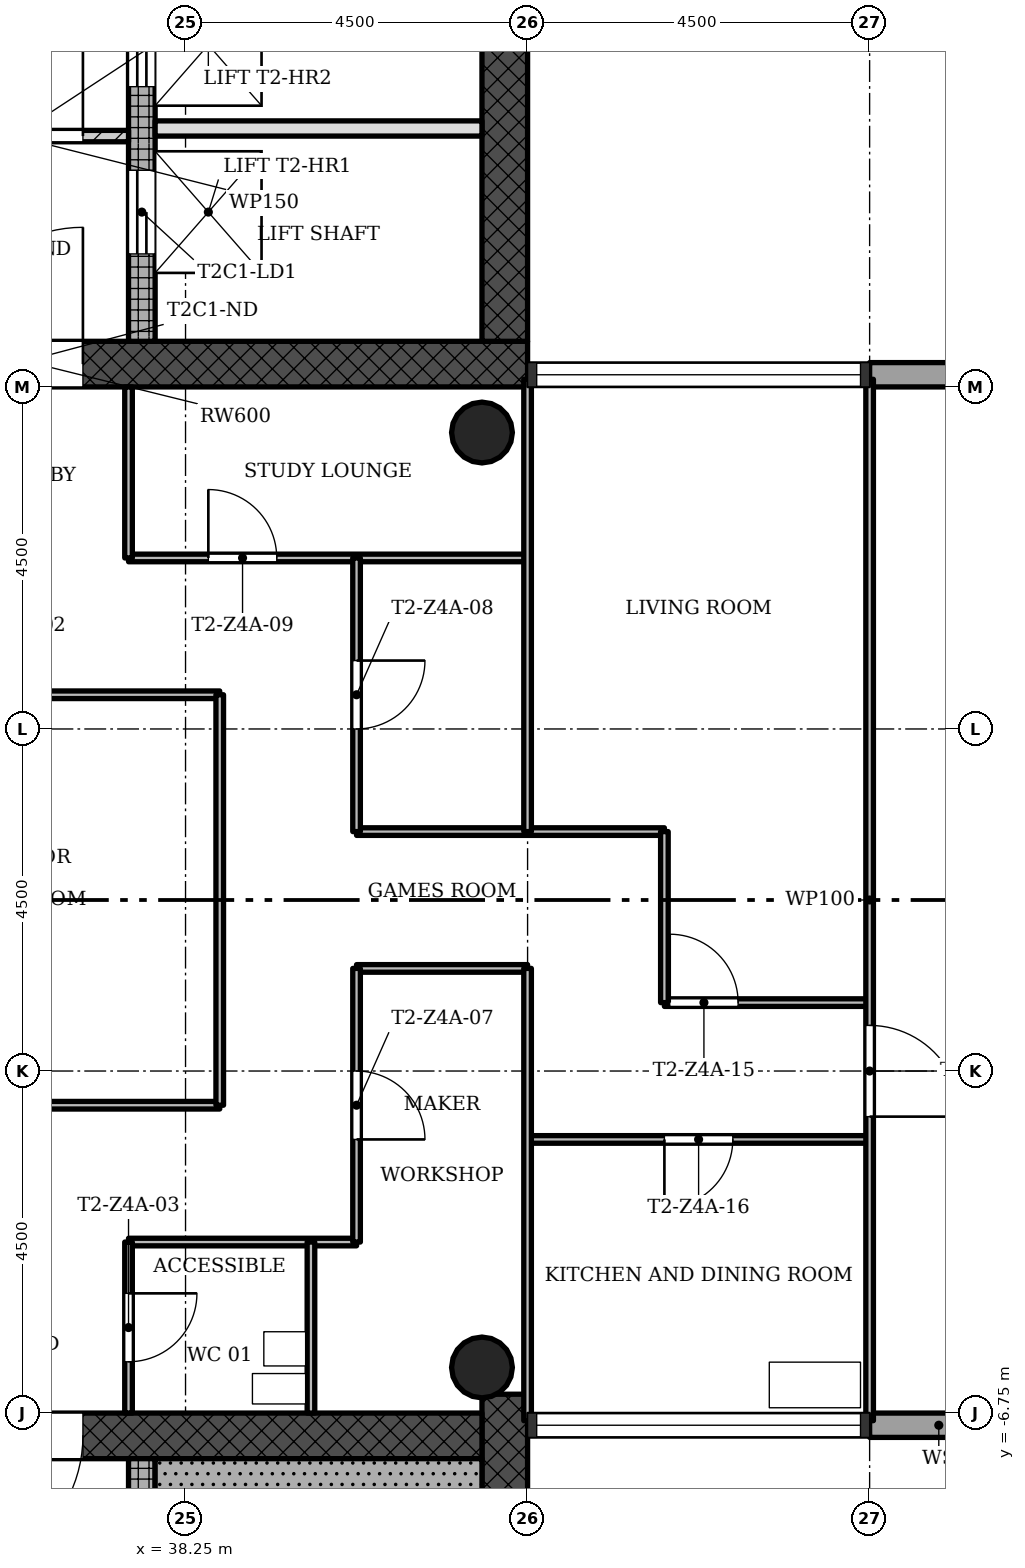
"""IFC4 building model, lengths in metres.
Left out: names, types, materials, properties, quantities, classifications, styles, units other than length and angle.
Written with IfcOpenShell. Run it as: python <this file> out.ifc"""

import sys

from ifc_helpers import new_model, si_unit, direction, frame, frame_2d, origin, origin_2d, place, context, subcontext, project, spatial, rectangle, hollow_circle, extrude, element, fill, save


model = new_model("IFC4")
c1 = context("Model", 3, precision=1e-05, world=origin(), true_north=direction((0.0, 1.0)))
c2 = subcontext(c1, "Body", "Model", "MODEL_VIEW")
j1 = project(units=[si_unit("LENGTHUNIT", "METRE"), si_unit("PLANEANGLEUNIT", "RADIAN")], contexts=[c1])
p1 = place(None, origin())
s1 = spatial("IfcSite", under=j1, at=p1, CompositionType="ELEMENT")
p2 = place(p1, origin())
s2 = spatial("IfcBuilding", under=s1, at=p2, CompositionType="ELEMENT")
p3 = place(p2, frame((0.0, 0.0, 226.6)))
s3 = spatial("IfcBuildingStorey", under=s2, at=p3, CompositionType="ELEMENT", Elevation=226.6)
p4 = place(p3, frame((29.85, 7.05, 0.0), z_axis=(0.0, 0.0, 1.0), x_axis=(1.0, 0.0, 0.0)))
e1 = element("IfcWall", 1, at=p4, inside=s3, PredefinedType="SHEAR", context=c2, shape_type="SweptSolid", body=[
    extrude(rectangle(XDim=12.9, YDim=0.6, at=frame_2d((6.45, 0.0))), origin(), (0.0, 0.0, 1.0), 3.4),
])
p5 = place(p4, frame((5.25, 0.0, 0.0)))
e2 = element("IfcOpeningElement", 2, at=p5, cuts=e1, PredefinedType="OPENING", context=c2, shape_type="SweptSolid", body=[
    extrude(rectangle(XDim=1.8, YDim=2.1, at=frame_2d((0.9, 1.05))), frame((0.0, 0.31, 0.0), z_axis=(0.0, -1.0, 0.0), x_axis=(1.0, 0.0, 0.0)), (0.0, 0.0, 1.0), 0.62),
])
p6 = place(p3, frame((42.45, 7.35, 0.0), z_axis=(0.0, 0.0, 1.0), x_axis=(0.0, 1.0, 0.0)))
e3 = element("IfcWall", 3, at=p6, inside=s3, PredefinedType="SHEAR", context=c2, shape_type="SweptSolid", body=[
    extrude(rectangle(XDim=8.4, YDim=0.6, at=frame_2d((4.2, 0.0))), origin(), (0.0, 0.0, 1.0), 3.4),
])
p7 = place(p3, frame((37.675, 7.35, 0.0), z_axis=(0.0, 0.0, 1.0), x_axis=(0.0, 1.0, 0.0)))
e4 = element("IfcWall", 4, at=p7, inside=s3, PredefinedType="SHEAR", context=c2, shape_type="SweptSolid", body=[
    extrude(rectangle(XDim=7.8, YDim=0.35, at=frame_2d((3.9, 0.0))), origin(), (0.0, 0.0, 1.0), 3.4),
])
p8 = place(p7, frame((1.15, 0.0, 0.0)))
e5 = element("IfcOpeningElement", 5, at=p8, cuts=e4, PredefinedType="OPENING", context=c2, shape_type="SweptSolid", body=[
    extrude(rectangle(XDim=1.1, YDim=2.1, at=frame_2d((0.55, 1.05))), frame((0.0, 0.185, 0.0), z_axis=(0.0, -1.0, 0.0), x_axis=(1.0, 0.0, 0.0)), (0.0, 0.0, 1.0), 0.37),
])
p9 = place(p7, frame((3.35, 0.0, 0.0)))
e6 = element("IfcOpeningElement", 6, at=p9, cuts=e4, PredefinedType="OPENING", context=c2, shape_type="SweptSolid", body=[
    extrude(rectangle(XDim=1.1, YDim=2.1, at=frame_2d((0.55, 1.05))), frame((0.0, 0.185, 0.0), z_axis=(0.0, -1.0, 0.0), x_axis=(1.0, 0.0, 0.0)), (0.0, 0.0, 1.0), 0.37),
])
p10 = place(p7, frame((5.55, 0.0, 0.0)))
e7 = element("IfcOpeningElement", 7, at=p10, cuts=e4, PredefinedType="OPENING", context=c2, shape_type="SweptSolid", body=[
    extrude(rectangle(XDim=1.1, YDim=2.1, at=frame_2d((0.55, 1.05))), frame((0.0, 0.185, 0.0), z_axis=(0.0, -1.0, 0.0), x_axis=(1.0, 0.0, 0.0)), (0.0, 0.0, 1.0), 0.37),
])
p11 = place(p3, frame((42.45, -15.15, 0.0), z_axis=(0.0, 0.0, 1.0), x_axis=(0.0, 1.0, 0.0)))
e8 = element("IfcWall", 8, at=p11, inside=s3, PredefinedType="SHEAR", context=c2, shape_type="SweptSolid", body=[
    extrude(rectangle(XDim=8.648, YDim=0.6, at=frame_2d((4.324, 0.0))), origin(), (0.0, 0.0, 1.0), 3.4),
])
p12 = place(p3, frame((42.15, -7.05, 0.0), z_axis=(0.0, 0.0, 1.0), x_axis=(-1.0, 0.0, 0.0)))
e9 = element("IfcWall", 9, at=p12, inside=s3, PredefinedType="SHEAR", context=c2, shape_type="SweptSolid", body=[
    extrude(rectangle(XDim=12.9, YDim=0.6, at=frame_2d((6.45, 0.0))), origin(), (0.0, 0.0, 1.0), 3.4),
])
p13 = place(p12, frame((5.25, 0.0, 0.0)))
e10 = element("IfcOpeningElement", 10, at=p13, cuts=e9, PredefinedType="OPENING", context=c2, shape_type="SweptSolid", body=[
    extrude(rectangle(XDim=1.8, YDim=2.1, at=frame_2d((0.9, 1.05))), frame((0.0, 0.31, 0.0), z_axis=(0.0, -1.0, 0.0), x_axis=(1.0, 0.0, 0.0)), (0.0, 0.0, 1.0), 0.62),
])
p14 = place(p3, frame((37.675, -15.15, 0.0), z_axis=(0.0, 0.0, 1.0), x_axis=(0.0, 1.0, 0.0)))
e11 = element("IfcWall", 11, at=p14, inside=s3, PredefinedType="SHEAR", context=c2, shape_type="SweptSolid", body=[
    extrude(rectangle(XDim=7.8, YDim=0.35, at=frame_2d((3.9, 0.0))), origin(), (0.0, 0.0, 1.0), 3.4),
])
p15 = place(p14, frame((5.85, 0.0, 0.0)))
e12 = element("IfcOpeningElement", 12, at=p15, cuts=e11, PredefinedType="OPENING", context=c2, shape_type="SweptSolid", body=[
    extrude(rectangle(XDim=0.9, YDim=2.1, at=frame_2d((0.45, 1.05))), frame((0.0, 0.185, 0.0), z_axis=(0.0, -1.0, 0.0), x_axis=(1.0, 0.0, 0.0)), (0.0, 0.0, 1.0), 0.37),
])
for number, where, z_axis, x_axis in (
    (13, (42.15, -6.15, 0.0), (0.0, 0.0, 1.0), (1.0, 0.0, 0.0)),
    (14, (42.15, 6.15, 0.0), (0.0, 0.0, 1.0), (1.0, 0.0, 0.0)),
):
    element("IfcColumn", number, at=place(p3, frame(where, z_axis=z_axis, x_axis=x_axis)), inside=s3, PredefinedType="COLUMN", context=c2, shape_type="SweptSolid", body=[
        extrude(hollow_circle(Radius=0.4, WallThickness=0.028, at=origin_2d()), origin(), (0.0, 0.0, 1.0), 3.4),
    ])
p16 = place(p3, frame((47.25, -6.91, -0.3), z_axis=(0.0, 0.0, 1.0), x_axis=(1.0, 0.0, 0.0)))
e15 = element("IfcWall", 15, at=p16, inside=s3, PredefinedType="STANDARD", context=c2, shape_type="SweptSolid", body=[
    extrude(rectangle(XDim=1.82, YDim=0.32, at=frame_2d((0.91, 0.0))), origin(), (0.0, 0.0, 1.0), 3.4),
])
p17 = place(p3, frame((48.75, 6.91, -0.3), z_axis=(0.0, 0.0, 1.0), x_axis=(-1.0, 0.0, 0.0)))
e16 = element("IfcWall", 16, at=p17, inside=s3, PredefinedType="STANDARD", context=c2, shape_type="SweptSolid", body=[
    extrude(rectangle(XDim=1.5, YDim=0.32, at=frame_2d((0.75, 0.0))), origin(), (0.0, 0.0, 1.0), 3.4),
])
p18 = place(p3, frame((37.5, 10.05, 0.0), z_axis=(0.0, 0.0, 1.0), x_axis=(-1.0, 0.0, 0.0)))
e17 = element("IfcWall", 17, at=p18, inside=s3, PredefinedType="PARTITIONING", context=c2, shape_type="SweptSolid", body=[
    extrude(rectangle(XDim=3.0, YDim=0.15, at=frame_2d((1.5, 0.0))), origin(), (0.0, 0.0, 1.0), 3.0),
])
p19 = place(p18, frame((0.6, 0.0, 0.0)))
e18 = element("IfcOpeningElement", 18, at=p19, cuts=e17, PredefinedType="OPENING", context=c2, shape_type="SweptSolid", body=[
    extrude(rectangle(XDim=1.8, YDim=2.1, at=frame_2d((0.9, 1.05))), frame((0.0, 0.085, 0.0), z_axis=(0.0, -1.0, 0.0), x_axis=(1.0, 0.0, 0.0)), (0.0, 0.0, 1.0), 0.17),
])
p20 = place(p3, frame((42.15, 10.15, 0.0), z_axis=(0.0, 0.0, 1.0), x_axis=(-1.0, 0.0, 0.0)))
e19 = element("IfcWall", 19, at=p20, inside=s3, PredefinedType="SOLIDWALL", context=c2, shape_type="SweptSolid", body=[
    extrude(rectangle(XDim=4.3, YDim=0.2, at=frame_2d((2.15, 0.0))), origin(), (0.0, 0.0, 1.0), 3.0),
])
p21 = place(p3, frame((40.5, -4.5, 0.0), z_axis=(0.0, 0.0, 1.0), x_axis=(-1.0, 0.0, 0.0)))
e20 = element("IfcWall", 20, at=p21, inside=s3, PredefinedType="PARTITIONING", context=c2, shape_type="SweptSolid", body=[
    extrude(rectangle(XDim=3.0, YDim=0.1, at=frame_2d((1.5, 0.0))), origin(), (0.0, 0.0, 1.0), 3.0),
])
p22 = place(p3, frame((47.25, -3.15, 0.0), z_axis=(0.0, 0.0, 1.0), x_axis=(-1.0, 0.0, 0.0)))
e21 = element("IfcWall", 21, at=p22, inside=s3, PredefinedType="PARTITIONING", context=c2, shape_type="SweptSolid", body=[
    extrude(rectangle(XDim=4.5, YDim=0.1, at=frame_2d((2.25, 0.0))), origin(), (0.0, 0.0, 1.0), 3.0),
])
p23 = place(p22, frame((1.8, 0.0, 0.0)))
e22 = element("IfcOpeningElement", 22, at=p23, cuts=e21, PredefinedType="OPENING", context=c2, shape_type="SweptSolid", body=[
    extrude(rectangle(XDim=0.9, YDim=2.1, at=frame_2d((0.45, 1.05))), frame((0.0, 0.06, 0.0), z_axis=(0.0, -1.0, 0.0), x_axis=(1.0, 0.0, 0.0)), (0.0, 0.0, 1.0), 0.12),
])
p24 = place(p3, frame((38.7, -2.7, 0.0), z_axis=(0.0, 0.0, 1.0), x_axis=(-1.0, 0.0, 0.0)))
e23 = element("IfcWall", 23, at=p24, inside=s3, PredefinedType="PARTITIONING", context=c2, shape_type="SweptSolid", body=[
    extrude(rectangle(XDim=5.4, YDim=0.1, at=frame_2d((2.7, 0.0))), origin(), (0.0, 0.0, 1.0), 3.0),
])
p25 = place(p3, frame((47.25, -1.35, 0.0), z_axis=(0.0, 0.0, 1.0), x_axis=(-1.0, 0.0, 0.0)))
e24 = element("IfcWall", 24, at=p25, inside=s3, PredefinedType="PARTITIONING", context=c2, shape_type="SweptSolid", body=[
    extrude(rectangle(XDim=2.7, YDim=0.1, at=frame_2d((1.35, 0.0))), origin(), (0.0, 0.0, 1.0), 3.0),
])
p26 = place(p25, frame((1.73, 0.0, 0.0)))
e25 = element("IfcOpeningElement", 25, at=p26, cuts=e24, PredefinedType="OPENING", context=c2, shape_type="SweptSolid", body=[
    extrude(rectangle(XDim=0.9, YDim=2.1, at=frame_2d((0.45, 1.05))), frame((0.0, 0.06, 0.0), z_axis=(0.0, -1.0, 0.0), x_axis=(1.0, 0.0, 0.0)), (0.0, 0.0, 1.0), 0.12),
])
p27 = place(p3, frame((42.75, -0.9, 0.0), z_axis=(0.0, 0.0, 1.0), x_axis=(-1.0, 0.0, 0.0)))
e26 = element("IfcWall", 26, at=p27, inside=s3, PredefinedType="PARTITIONING", context=c2, shape_type="SweptSolid", body=[
    extrude(rectangle(XDim=2.25, YDim=0.1, at=frame_2d((1.125, 0.0))), origin(), (0.0, 0.0, 1.0), 3.0),
])
p28 = place(p3, frame((44.55, 0.9, 0.0), z_axis=(0.0, 0.0, 1.0), x_axis=(-1.0, 0.0, 0.0)))
e27 = element("IfcWall", 27, at=p28, inside=s3, PredefinedType="PARTITIONING", context=c2, shape_type="SweptSolid", body=[
    extrude(rectangle(XDim=4.05, YDim=0.1, at=frame_2d((2.025, 0.0))), origin(), (0.0, 0.0, 1.0), 3.0),
])
p29 = place(p3, frame((38.7, 2.7, 0.0), z_axis=(0.0, 0.0, 1.0), x_axis=(-1.0, 0.0, 0.0)))
e28 = element("IfcWall", 28, at=p29, inside=s3, PredefinedType="PARTITIONING", context=c2, shape_type="SweptSolid", body=[
    extrude(rectangle(XDim=5.4, YDim=0.1, at=frame_2d((2.7, 0.0))), origin(), (0.0, 0.0, 1.0), 3.0),
])
p30 = place(p29, frame((2.25, 0.0, 0.0)))
e29 = element("IfcOpeningElement", 29, at=p30, cuts=e28, PredefinedType="OPENING", context=c2, shape_type="SweptSolid", body=[
    extrude(rectangle(XDim=0.9, YDim=2.1, at=frame_2d((0.45, 1.05))), frame((0.0, 0.06, 0.0), z_axis=(0.0, -1.0, 0.0), x_axis=(1.0, 0.0, 0.0)), (0.0, 0.0, 1.0), 0.12),
])
p31 = place(p3, frame((42.75, 4.5, 0.0), z_axis=(0.0, 0.0, 1.0), x_axis=(-1.0, 0.0, 0.0)))
e30 = element("IfcWall", 30, at=p31, inside=s3, PredefinedType="PARTITIONING", context=c2, shape_type="SweptSolid", body=[
    extrude(rectangle(XDim=5.25, YDim=0.1, at=frame_2d((2.625, 0.0))), origin(), (0.0, 0.0, 1.0), 3.0),
])
p32 = place(p31, frame((3.3, 0.0, 0.0)))
e31 = element("IfcOpeningElement", 31, at=p32, cuts=e30, PredefinedType="OPENING", context=c2, shape_type="SweptSolid", body=[
    extrude(rectangle(XDim=0.9, YDim=2.1, at=frame_2d((0.45, 1.05))), frame((0.0, 0.06, 0.0), z_axis=(0.0, -1.0, 0.0), x_axis=(1.0, 0.0, 0.0)), (0.0, 0.0, 1.0), 0.12),
])
p33 = place(p3, frame((47.25, -6.85, 0.0), z_axis=(0.0, 0.0, 1.0), x_axis=(0.0, 1.0, 0.0)))
e32 = element("IfcWall", 32, at=p33, inside=s3, PredefinedType="PARTITIONING", context=c2, shape_type="SweptSolid", body=[
    extrude(rectangle(XDim=13.7, YDim=0.1, at=frame_2d((6.85, 0.0))), origin(), (0.0, 0.0, 1.0), 3.0),
])
p34 = place(p33, frame((4.0, 0.0, 0.0)))
e33 = element("IfcOpeningElement", 33, at=p34, cuts=e32, PredefinedType="OPENING", context=c2, shape_type="SweptSolid", body=[
    extrude(rectangle(XDim=1.2, YDim=2.1, at=frame_2d((0.6, 1.05))), frame((0.0, 0.06, 0.0), z_axis=(0.0, -1.0, 0.0), x_axis=(1.0, 0.0, 0.0)), (0.0, 0.0, 1.0), 0.12),
])
p35 = place(p3, frame((44.55, -1.35, 0.0), z_axis=(0.0, 0.0, 1.0), x_axis=(0.0, 1.0, 0.0)))
e34 = element("IfcWall", 34, at=p35, inside=s3, PredefinedType="PARTITIONING", context=c2, shape_type="SweptSolid", body=[
    extrude(rectangle(XDim=2.25, YDim=0.1, at=frame_2d((1.125, 0.0))), origin(), (0.0, 0.0, 1.0), 3.0),
])
for number, where, z_axis, x_axis in (
    (35, (42.75, -6.85, 0.0), (0.0, 0.0, 1.0), (0.0, 1.0, 0.0)),
    (36, (42.75, 0.9, 0.0), (0.0, 0.0, 1.0), (0.0, 1.0, 0.0)),
):
    element("IfcWall", number, at=place(p3, frame(where, z_axis=z_axis, x_axis=x_axis)), inside=s3, PredefinedType="PARTITIONING", context=c2, shape_type="SweptSolid", body=[
        extrude(rectangle(XDim=5.95, YDim=0.1, at=frame_2d((2.975, 0.0))), origin(), (0.0, 0.0, 1.0), 3.0),
    ])
p36 = place(p3, frame((40.5, -4.5, 0.0), z_axis=(0.0, 0.0, 1.0), x_axis=(0.0, 1.0, 0.0)))
e37 = element("IfcWall", 37, at=p36, inside=s3, PredefinedType="PARTITIONING", context=c2, shape_type="SweptSolid", body=[
    extrude(rectangle(XDim=3.6, YDim=0.1, at=frame_2d((1.8, 0.0))), origin(), (0.0, 0.0, 1.0), 3.0),
])
p37 = place(p36, frame((1.35, 0.0, 0.0)))
e38 = element("IfcOpeningElement", 38, at=p37, cuts=e37, PredefinedType="OPENING", context=c2, shape_type="SweptSolid", body=[
    extrude(rectangle(XDim=0.9, YDim=2.1, at=frame_2d((0.45, 1.05))), frame((0.0, 0.06, 0.0), z_axis=(0.0, -1.0, 0.0), x_axis=(1.0, 0.0, 0.0)), (0.0, 0.0, 1.0), 0.12),
])
p38 = place(p3, frame((40.5, 0.9, 0.0), z_axis=(0.0, 0.0, 1.0), x_axis=(0.0, 1.0, 0.0)))
e39 = element("IfcWall", 39, at=p38, inside=s3, PredefinedType="PARTITIONING", context=c2, shape_type="SweptSolid", body=[
    extrude(rectangle(XDim=3.6, YDim=0.1, at=frame_2d((1.8, 0.0))), origin(), (0.0, 0.0, 1.0), 3.0),
])
p39 = place(p38, frame((1.35, 0.0, 0.0)))
e40 = element("IfcOpeningElement", 40, at=p39, cuts=e39, PredefinedType="OPENING", context=c2, shape_type="SweptSolid", body=[
    extrude(rectangle(XDim=0.9, YDim=2.1, at=frame_2d((0.45, 1.05))), frame((0.0, 0.06, 0.0), z_axis=(0.0, -1.0, 0.0), x_axis=(1.0, 0.0, 0.0)), (0.0, 0.0, 1.0), 0.12),
])
p40 = place(p3, frame((39.9, -6.75, 0.0), z_axis=(0.0, 0.0, 1.0), x_axis=(0.0, 1.0, 0.0)))
e41 = element("IfcWall", 41, at=p40, inside=s3, PredefinedType="PARTITIONING", context=c2, shape_type="SweptSolid", body=[
    extrude(rectangle(XDim=2.25, YDim=0.1, at=frame_2d((1.125, 0.0))), origin(), (0.0, 0.0, 1.0), 3.0),
])
p41 = place(p3, frame((38.7, -2.7, 0.0), z_axis=(0.0, 0.0, 1.0), x_axis=(0.0, 1.0, 0.0)))
e42 = element("IfcWall", 42, at=p41, inside=s3, PredefinedType="PARTITIONING", context=c2, shape_type="SweptSolid", body=[
    extrude(rectangle(XDim=5.4, YDim=0.1, at=frame_2d((2.7, 0.0))), origin(), (0.0, 0.0, 1.0), 3.0),
])
p42 = place(p3, frame((37.5, -6.75, 0.0), z_axis=(0.0, 0.0, 1.0), x_axis=(0.0, 1.0, 0.0)))
e43 = element("IfcWall", 43, at=p42, inside=s3, PredefinedType="PARTITIONING", context=c2, shape_type="SweptSolid", body=[
    extrude(rectangle(XDim=2.25, YDim=0.1, at=frame_2d((1.125, 0.0))), origin(), (0.0, 0.0, 1.0), 3.0),
])
p43 = place(p42, frame((0.675, 0.0, 0.0)))
e44 = element("IfcOpeningElement", 44, at=p43, cuts=e43, PredefinedType="OPENING", context=c2, shape_type="SweptSolid", body=[
    extrude(rectangle(XDim=0.9, YDim=2.1, at=frame_2d((0.45, 1.05))), frame((0.0, 0.06, 0.0), z_axis=(0.0, -1.0, 0.0), x_axis=(1.0, 0.0, 0.0)), (0.0, 0.0, 1.0), 0.12),
])
p44 = place(p3, frame((37.5, 4.5, 0.0), z_axis=(0.0, 0.0, 1.0), x_axis=(0.0, 1.0, 0.0)))
e45 = element("IfcWall", 45, at=p44, inside=s3, PredefinedType="PARTITIONING", context=c2, shape_type="SweptSolid", body=[
    extrude(rectangle(XDim=2.25, YDim=0.1, at=frame_2d((1.125, 0.0))), origin(), (0.0, 0.0, 1.0), 3.0),
])
p45 = place(p3, frame((37.85, -7.65, 0.0), z_axis=(0.0, 0.0, 1.0), x_axis=(1.0, 0.0, 0.0)))
e46 = element("IfcWall", 46, at=p45, inside=s3, PredefinedType="SHEAR", context=c2, shape_type="SweptSolid", body=[
    extrude(rectangle(XDim=4.3, YDim=0.6, at=frame_2d((2.15, 0.0))), origin(), (0.0, 0.0, 1.0), 3.4),
])
p46 = place(p19, origin())
e47 = element("IfcDoor", 47, at=p46, inside=s3, OperationType="SINGLE_SWING_LEFT", PredefinedType="DOOR", context=c2, shape_type="SweptSolid", body=[
    extrude(rectangle(XDim=1.8, YDim=2.1, at=frame_2d((0.9, 1.05))), frame((0.0, 0.025, 0.0), z_axis=(0.0, -1.0, 0.0), x_axis=(1.0, 0.0, 0.0)), (0.0, 0.0, 1.0), 0.05),
])
fill(e18, e47)
p47 = place(p43, origin())
e48 = element("IfcDoor", 48, at=p47, inside=s3, OperationType="SINGLE_SWING_RIGHT", PredefinedType="DOOR", context=c2, shape_type="SweptSolid", body=[
    extrude(rectangle(XDim=0.9, YDim=2.1, at=frame_2d((0.45, 1.05))), frame((0.0, 0.025, 0.0), z_axis=(0.0, -1.0, 0.0), x_axis=(1.0, 0.0, 0.0)), (0.0, 0.0, 1.0), 0.05),
])
fill(e44, e48)
p48 = place(p37, origin())
e49 = element("IfcDoor", 49, at=p48, inside=s3, OperationType="SINGLE_SWING_LEFT", PredefinedType="DOOR", context=c2, shape_type="SweptSolid", body=[
    extrude(rectangle(XDim=0.9, YDim=2.1, at=frame_2d((0.45, 1.05))), frame((0.0, 0.025, 0.0), z_axis=(0.0, -1.0, 0.0), x_axis=(1.0, 0.0, 0.0)), (0.0, 0.0, 1.0), 0.05),
])
fill(e38, e49)
p49 = place(p39, origin())
e50 = element("IfcDoor", 50, at=p49, inside=s3, OperationType="SINGLE_SWING_RIGHT", PredefinedType="DOOR", context=c2, shape_type="SweptSolid", body=[
    extrude(rectangle(XDim=0.9, YDim=2.1, at=frame_2d((0.45, 1.05))), frame((0.0, 0.025, 0.0), z_axis=(0.0, -1.0, 0.0), x_axis=(1.0, 0.0, 0.0)), (0.0, 0.0, 1.0), 0.05),
])
fill(e40, e50)
p50 = place(p32, origin())
e51 = element("IfcDoor", 51, at=p50, inside=s3, OperationType="SINGLE_SWING_RIGHT", PredefinedType="DOOR", context=c2, shape_type="SweptSolid", body=[
    extrude(rectangle(XDim=0.9, YDim=2.1, at=frame_2d((0.45, 1.05))), frame((0.0, 0.025, 0.0), z_axis=(0.0, -1.0, 0.0), x_axis=(1.0, 0.0, 0.0)), (0.0, 0.0, 1.0), 0.05),
])
fill(e31, e51)
p51 = place(p26, origin())
e52 = element("IfcDoor", 52, at=p51, inside=s3, OperationType="SINGLE_SWING_RIGHT", PredefinedType="DOOR", context=c2, shape_type="SweptSolid", body=[
    extrude(rectangle(XDim=0.9, YDim=2.1, at=frame_2d((0.45, 1.05))), frame((0.0, 0.025, 0.0), z_axis=(0.0, -1.0, 0.0), x_axis=(1.0, 0.0, 0.0)), (0.0, 0.0, 1.0), 0.05),
])
fill(e25, e52)
p52 = place(p23, origin())
e53 = element("IfcDoor", 53, at=p52, inside=s3, OperationType="SINGLE_SWING_LEFT", PredefinedType="DOOR", context=c2, shape_type="SweptSolid", body=[
    extrude(rectangle(XDim=0.9, YDim=2.1, at=frame_2d((0.45, 1.05))), frame((0.0, 0.025, 0.0), z_axis=(0.0, -1.0, 0.0), x_axis=(1.0, 0.0, 0.0)), (0.0, 0.0, 1.0), 0.05),
])
fill(e22, e53)
p53 = place(p34, origin())
e54 = element("IfcDoor", 54, at=p53, inside=s3, OperationType="SINGLE_SWING_LEFT", PredefinedType="DOOR", context=c2, shape_type="SweptSolid", body=[
    extrude(rectangle(XDim=1.2, YDim=2.1, at=frame_2d((0.6, 1.05))), frame((0.0, 0.025, 0.0), z_axis=(0.0, -1.0, 0.0), x_axis=(1.0, 0.0, 0.0)), (0.0, 0.0, 1.0), 0.05),
])
fill(e33, e54)
p54 = place(p8, origin())
e55 = element("IfcDoor", 55, at=p54, inside=s3, OperationType="SLIDING_TO_LEFT", PredefinedType="DOOR", context=c2, shape_type="SweptSolid", body=[
    extrude(rectangle(XDim=1.1, YDim=2.1, at=frame_2d((0.55, 1.05))), frame((0.0, 0.025, 0.0), z_axis=(0.0, -1.0, 0.0), x_axis=(1.0, 0.0, 0.0)), (0.0, 0.0, 1.0), 0.05),
])
fill(e5, e55)
p55 = place(p9, origin())
e56 = element("IfcDoor", 56, at=p55, inside=s3, OperationType="SLIDING_TO_LEFT", PredefinedType="DOOR", context=c2, shape_type="SweptSolid", body=[
    extrude(rectangle(XDim=1.1, YDim=2.1, at=frame_2d((0.55, 1.05))), frame((0.0, 0.025, 0.0), z_axis=(0.0, -1.0, 0.0), x_axis=(1.0, 0.0, 0.0)), (0.0, 0.0, 1.0), 0.05),
])
fill(e6, e56)
p56 = place(p5, origin())
e57 = element("IfcDoor", 57, at=p56, inside=s3, OperationType="SINGLE_SWING_LEFT", PredefinedType="DOOR", context=c2, shape_type="SweptSolid", body=[
    extrude(rectangle(XDim=1.8, YDim=2.1, at=frame_2d((0.9, 1.05))), frame((0.0, 0.025, 0.0), z_axis=(0.0, -1.0, 0.0), x_axis=(1.0, 0.0, 0.0)), (0.0, 0.0, 1.0), 0.05),
])
fill(e2, e57)
p57 = place(p13, origin())
e58 = element("IfcDoor", 58, at=p57, inside=s3, OperationType="SINGLE_SWING_LEFT", PredefinedType="DOOR", context=c2, shape_type="SweptSolid", body=[
    extrude(rectangle(XDim=1.8, YDim=2.1, at=frame_2d((0.9, 1.05))), frame((0.0, 0.025, 0.0), z_axis=(0.0, -1.0, 0.0), x_axis=(1.0, 0.0, 0.0)), (0.0, 0.0, 1.0), 0.05),
])
fill(e10, e58)
save(model, sys.argv[1])
